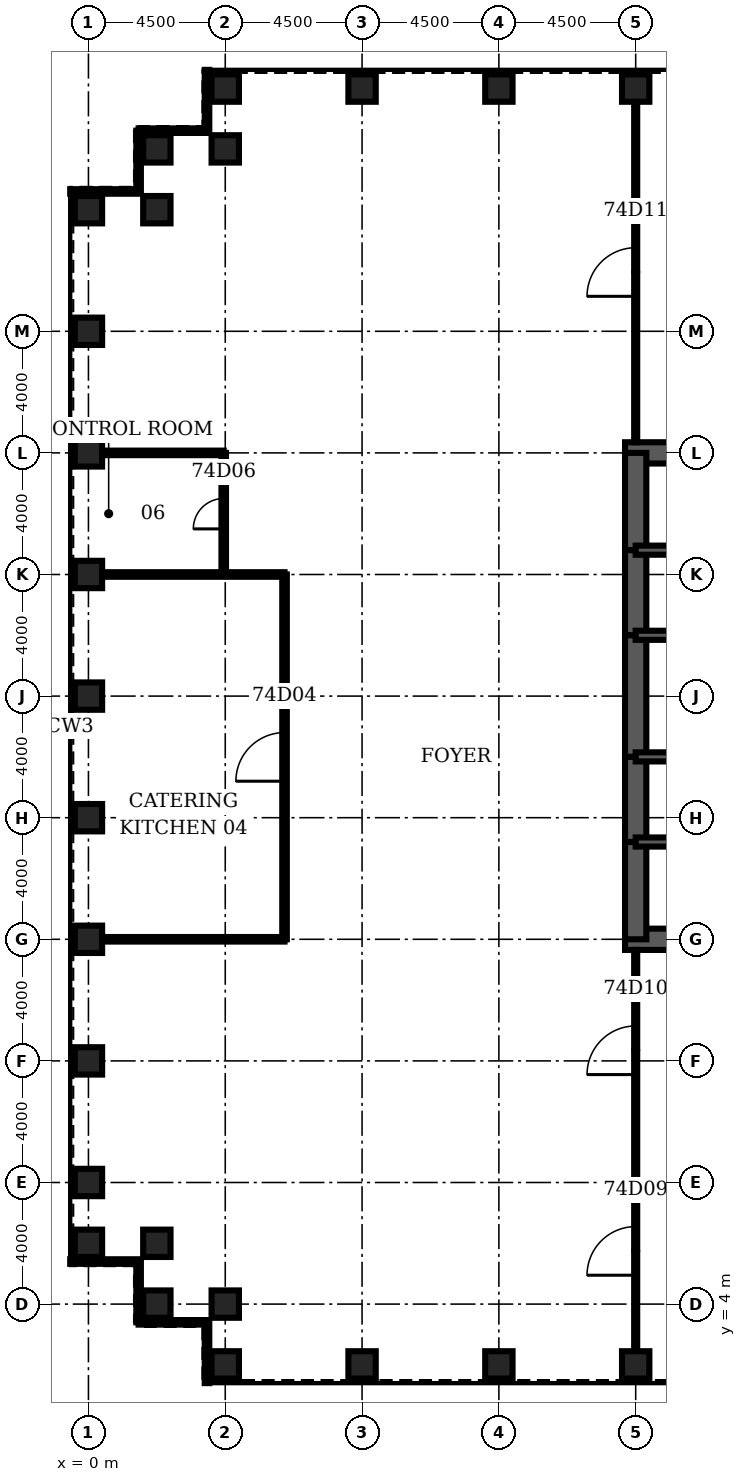
"""IFC4 building model, lengths in metres.
Left out: names, types, materials, properties, quantities, classifications, styles, units other than length and angle.
Written with IfcOpenShell. Run it as: python <this file> out.ifc"""

import sys

from ifc_helpers import new_model, si_unit, direction, frame, frame_2d, origin, origin_2d, place, context, subcontext, project, spatial, rectangle, hollow_rectangle, extrude, element, fill, save


model = new_model("IFC4")
c1 = context("Model", 3, precision=1e-05, world=origin(), true_north=direction((0.0, 1.0)))
c2 = subcontext(c1, "Body", "Model", "MODEL_VIEW")
j1 = project(units=[si_unit("LENGTHUNIT", "METRE"), si_unit("PLANEANGLEUNIT", "RADIAN")], contexts=[c1])
p1 = place(None, origin())
s1 = spatial("IfcSite", under=j1, at=p1, CompositionType="ELEMENT")
p2 = place(p1, origin())
s2 = spatial("IfcBuilding", under=s1, at=p2, CompositionType="ELEMENT")
p3 = place(p2, frame((0.0, 0.0, 325.7)))
s3 = spatial("IfcBuildingStorey", under=s2, at=p3, CompositionType="ELEMENT", Elevation=325.7)
for number, where, z_axis, x_axis in (
    (1, (4.5, 2.0, 0.0), (0.0, 0.0, 1.0), (0.0, 1.0, 0.0)),
    (2, (9.0, 2.0, 0.0), (0.0, 0.0, 1.0), (0.0, 1.0, 0.0)),
    (3, (13.5, 2.0, 0.0), (0.0, 0.0, 1.0), (0.0, 1.0, 0.0)),
    (4, (18.0, 2.0, 0.0), (0.0, 0.0, 1.0), (0.0, 1.0, 0.0)),
    (5, (18.0, 44.0, 0.0), (0.0, 0.0, 1.0), (0.0, 1.0, 0.0)),
    (6, (13.5, 44.0, 0.0), (0.0, 0.0, 1.0), (0.0, 1.0, 0.0)),
    (7, (9.0, 44.0, 0.0), (0.0, 0.0, 1.0), (0.0, 1.0, 0.0)),
    (8, (4.5, 44.0, 0.0), (0.0, 0.0, 1.0), (0.0, 1.0, 0.0)),
    (9, (4.5, 42.0, 0.0), (0.0, 0.0, 1.0), (0.0, 1.0, 0.0)),
    (10, (2.25, 42.0, 0.0), (0.0, 0.0, 1.0), (1.0, 0.0, 0.0)),
    (11, (2.25, 40.0, 0.0), (0.0, 0.0, 1.0), (1.0, 0.0, 0.0)),
    (12, (0.0, 40.0, 0.0), (0.0, 0.0, 1.0), (1.0, 0.0, 0.0)),
    (13, (0.0, 36.0, 0.0), (0.0, 0.0, 1.0), (1.0, 0.0, 0.0)),
    (14, (0.0, 32.0, 0.0), (0.0, 0.0, 1.0), (1.0, 0.0, 0.0)),
    (15, (0.0, 28.0, 0.0), (0.0, 0.0, 1.0), (1.0, 0.0, 0.0)),
    (16, (0.0, 24.0, 0.0), (0.0, 0.0, 1.0), (1.0, 0.0, 0.0)),
    (17, (0.0, 20.0, 0.0), (0.0, 0.0, 1.0), (1.0, 0.0, 0.0)),
    (18, (0.0, 16.0, 0.0), (0.0, 0.0, 1.0), (1.0, 0.0, 0.0)),
    (19, (0.0, 12.0, 0.0), (0.0, 0.0, 1.0), (1.0, 0.0, 0.0)),
    (20, (0.0, 8.0, 0.0), (0.0, 0.0, 1.0), (1.0, 0.0, 0.0)),
    (21, (0.0, 6.0, 0.0), (0.0, 0.0, 1.0), (1.0, 0.0, 0.0)),
    (22, (2.25, 6.0, 0.0), (0.0, 0.0, 1.0), (1.0, 0.0, 0.0)),
    (23, (2.25, 4.0, 0.0), (0.0, 0.0, 1.0), (1.0, 0.0, 0.0)),
    (24, (4.5, 4.0, 0.0), (0.0, 0.0, 1.0), (0.0, 1.0, 0.0)),
):
    element("IfcColumn", number, at=place(p3, frame(where, z_axis=z_axis, x_axis=x_axis)), inside=s3, PredefinedType="COLUMN", context=c2, shape_type="SweptSolid", body=[
        extrude(hollow_rectangle(XDim=0.9, YDim=0.9, WallThickness=0.05, at=origin_2d()), origin(), (0.0, 0.0, 1.0), 4.2),
    ])
for number, where, z_axis, x_axis in (
    (25, (17.65, 16.0, 0.0), (0.0, 0.0, 1.0), (1.0, 0.0, 0.0)),
    (26, (27.0, 32.0, 0.0), (0.0, 0.0, 1.0), (-1.0, 0.0, 0.0)),
):
    element("IfcWall", number, at=place(p3, frame(where, z_axis=z_axis, x_axis=x_axis)), inside=s3, PredefinedType="SHEAR", context=c2, shape_type="SweptSolid", body=[
        extrude(rectangle(XDim=9.35, YDim=0.7, at=frame_2d((4.675, 0.0))), origin(), (0.0, 0.0, 1.0), 4.2),
    ])
p4 = place(p3, frame((18.0, 32.0, 0.0), z_axis=(0.0, 0.0, 1.0), x_axis=(0.0, -1.0, 0.0)))
e27 = element("IfcWall", 27, at=p4, inside=s3, PredefinedType="SHEAR", context=c2, shape_type="SweptSolid", body=[
    extrude(rectangle(XDim=3.2, YDim=0.7, at=frame_2d((1.6, 0.0))), origin(), (0.0, 0.0, 1.0), 4.2),
])
p5 = place(p3, frame((18.0, 28.8, 0.0), z_axis=(0.0, 0.0, 1.0), x_axis=(0.0, -1.0, 0.0)))
e28 = element("IfcWall", 28, at=p5, inside=s3, PredefinedType="SHEAR", context=c2, shape_type="SweptSolid", body=[
    extrude(rectangle(XDim=2.8, YDim=0.7, at=frame_2d((1.4, 0.0))), origin(), (0.0, 0.0, 1.0), 4.2),
])
p6 = place(p5, frame((0.4, 0.0, 0.0)))
e29 = element("IfcOpeningElement", 29, at=p6, cuts=e28, PredefinedType="OPENING", context=c2, shape_type="SweptSolid", body=[
    extrude(rectangle(XDim=1.8, YDim=2.1, at=frame_2d((0.9, 1.05))), frame((0.0, 0.36, 0.0), z_axis=(0.0, -1.0, 0.0), x_axis=(1.0, 0.0, 0.0)), (0.0, 0.0, 1.0), 0.72),
])
p7 = place(p3, frame((18.0, 26.0, 0.0), z_axis=(0.0, 0.0, 1.0), x_axis=(0.0, -1.0, 0.0)))
e30 = element("IfcWall", 30, at=p7, inside=s3, PredefinedType="SHEAR", context=c2, shape_type="SweptSolid", body=[
    extrude(rectangle(XDim=4.0, YDim=0.7, at=frame_2d((2.0, 0.0))), origin(), (0.0, 0.0, 1.0), 4.2),
])
p8 = place(p3, frame((18.0, 22.0, 0.0), z_axis=(0.0, 0.0, 1.0), x_axis=(0.0, -1.0, 0.0)))
e31 = element("IfcWall", 31, at=p8, inside=s3, PredefinedType="SHEAR", context=c2, shape_type="SweptSolid", body=[
    extrude(rectangle(XDim=2.8, YDim=0.7, at=frame_2d((1.4, 0.0))), origin(), (0.0, 0.0, 1.0), 4.2),
])
p9 = place(p8, frame((0.6, 0.0, 0.0)))
e32 = element("IfcOpeningElement", 32, at=p9, cuts=e31, PredefinedType="OPENING", context=c2, shape_type="SweptSolid", body=[
    extrude(rectangle(XDim=1.8, YDim=2.1, at=frame_2d((0.9, 1.05))), frame((0.0, 0.36, 0.0), z_axis=(0.0, -1.0, 0.0), x_axis=(1.0, 0.0, 0.0)), (0.0, 0.0, 1.0), 0.72),
])
p10 = place(p3, frame((18.0, 19.2, 0.0), z_axis=(0.0, 0.0, 1.0), x_axis=(0.0, -1.0, 0.0)))
e33 = element("IfcWall", 33, at=p10, inside=s3, PredefinedType="SHEAR", context=c2, shape_type="SweptSolid", body=[
    extrude(rectangle(XDim=3.2, YDim=0.7, at=frame_2d((1.6, 0.0))), origin(), (0.0, 0.0, 1.0), 4.2),
])
p11 = place(p3, frame((18.0, 19.2, 0.0), z_axis=(0.0, 0.0, 1.0), x_axis=(1.0, 0.0, 0.0)))
e34 = element("IfcWall", 34, at=p11, inside=s3, PredefinedType="SOLIDWALL", context=c2, shape_type="SweptSolid", body=[
    extrude(rectangle(XDim=9.0, YDim=0.3, at=frame_2d((4.5, 0.0))), origin(), (0.0, 0.0, 1.0), 4.2),
])
p12 = place(p11, frame((0.65, 0.0, 0.0)))
e35 = element("IfcOpeningElement", 35, at=p12, cuts=e34, PredefinedType="OPENING", context=c2, shape_type="SweptSolid", body=[
    extrude(rectangle(XDim=1.0, YDim=2.1, at=frame_2d((0.5, 1.05))), frame((0.0, 0.16, 0.0), z_axis=(0.0, -1.0, 0.0), x_axis=(1.0, 0.0, 0.0)), (0.0, 0.0, 1.0), 0.32),
])
p13 = place(p3, frame((18.0, 28.8, 0.0), z_axis=(0.0, 0.0, 1.0), x_axis=(1.0, 0.0, 0.0)))
e36 = element("IfcWall", 36, at=p13, inside=s3, PredefinedType="SOLIDWALL", context=c2, shape_type="SweptSolid", body=[
    extrude(rectangle(XDim=9.0, YDim=0.3, at=frame_2d((4.5, 0.0))), origin(), (0.0, 0.0, 1.0), 4.2),
])
p14 = place(p13, frame((0.65, 0.0, 0.0)))
e37 = element("IfcOpeningElement", 37, at=p14, cuts=e36, PredefinedType="OPENING", context=c2, shape_type="SweptSolid", body=[
    extrude(rectangle(XDim=1.0, YDim=2.1, at=frame_2d((0.5, 1.05))), frame((0.0, 0.16, 0.0), z_axis=(0.0, -1.0, 0.0), x_axis=(1.0, 0.0, 0.0)), (0.0, 0.0, 1.0), 0.32),
])
p15 = place(p3, frame((18.0, 22.0, 0.0), z_axis=(0.0, 0.0, 1.0), x_axis=(1.0, 0.0, 0.0)))
e38 = element("IfcWall", 38, at=p15, inside=s3, PredefinedType="SOLIDWALL", context=c2, shape_type="SweptSolid", body=[
    extrude(rectangle(XDim=6.0, YDim=0.3, at=frame_2d((3.0, 0.0))), origin(), (0.0, 0.0, 1.0), 4.2),
])
p16 = place(p15, frame((4.4, 0.0, 0.0)))
e39 = element("IfcOpeningElement", 39, at=p16, cuts=e38, PredefinedType="OPENING", context=c2, shape_type="SweptSolid", body=[
    extrude(rectangle(XDim=1.0, YDim=2.1, at=frame_2d((0.5, 1.05))), frame((0.0, 0.16, 0.0), z_axis=(0.0, -1.0, 0.0), x_axis=(1.0, 0.0, 0.0)), (0.0, 0.0, 1.0), 0.32),
])
p17 = place(p15, frame((0.75, 0.0, 0.0)))
e40 = element("IfcOpeningElement", 40, at=p17, cuts=e38, PredefinedType="OPENING", context=c2, shape_type="SweptSolid", body=[
    extrude(rectangle(XDim=1.0, YDim=2.1, at=frame_2d((0.5, 1.05))), frame((0.0, 0.16, 0.0), z_axis=(0.0, -1.0, 0.0), x_axis=(1.0, 0.0, 0.0)), (0.0, 0.0, 1.0), 0.32),
])
p18 = place(p3, frame((18.0, 26.0, 0.0), z_axis=(0.0, 0.0, 1.0), x_axis=(1.0, 0.0, 0.0)))
e41 = element("IfcWall", 41, at=p18, inside=s3, PredefinedType="SOLIDWALL", context=c2, shape_type="SweptSolid", body=[
    extrude(rectangle(XDim=6.0, YDim=0.3, at=frame_2d((3.0, 0.0))), origin(), (0.0, 0.0, 1.0), 4.2),
])
for number, where, z_axis, x_axis in (
    (42, (0.45, 16.0, 0.0), (0.0, 0.0, 1.0), (1.0, 0.0, 0.0)),
    (43, (0.45, 28.0, 0.0), (0.0, 0.0, 1.0), (1.0, 0.0, 0.0)),
):
    element("IfcWall", number, at=place(p3, frame(where, z_axis=z_axis, x_axis=x_axis)), inside=s3, PredefinedType="PARTITIONING", context=c2, shape_type="SweptSolid", body=[
        extrude(rectangle(XDim=6.0, YDim=0.15, at=frame_2d((3.0, 0.0))), origin(), (0.0, 0.0, 1.0), 3.0),
    ])
p19 = place(p3, frame((0.45, 32.0, 0.0), z_axis=(0.0, 0.0, 1.0), x_axis=(1.0, 0.0, 0.0)))
e44 = element("IfcWall", 44, at=p19, inside=s3, PredefinedType="PARTITIONING", context=c2, shape_type="SweptSolid", body=[
    extrude(rectangle(XDim=4.0, YDim=0.15, at=frame_2d((2.0, 0.0))), origin(), (0.0, 0.0, 1.0), 3.0),
])
p20 = place(p3, frame((4.45, 28.0, 0.0), z_axis=(0.0, 0.0, 1.0), x_axis=(0.0, 1.0, 0.0)))
e45 = element("IfcWall", 45, at=p20, inside=s3, PredefinedType="PARTITIONING", context=c2, shape_type="SweptSolid", body=[
    extrude(rectangle(XDim=4.0, YDim=0.15, at=frame_2d((2.0, 0.0))), origin(), (0.0, 0.0, 1.0), 3.0),
])
p21 = place(p20, frame((1.5, 0.0, 0.0)))
e46 = element("IfcOpeningElement", 46, at=p21, cuts=e45, PredefinedType="OPENING", context=c2, shape_type="SweptSolid", body=[
    extrude(rectangle(XDim=1.0, YDim=2.1, at=frame_2d((0.5, 1.05))), frame((0.0, 0.085, 0.0), z_axis=(0.0, -1.0, 0.0), x_axis=(1.0, 0.0, 0.0)), (0.0, 0.0, 1.0), 0.17),
])
p22 = place(p3, frame((6.45, 16.0, 0.0), z_axis=(0.0, 0.0, 1.0), x_axis=(0.0, 1.0, 0.0)))
e47 = element("IfcWall", 47, at=p22, inside=s3, PredefinedType="PARTITIONING", context=c2, shape_type="SweptSolid", body=[
    extrude(rectangle(XDim=12.0, YDim=0.15, at=frame_2d((6.0, 0.0))), origin(), (0.0, 0.0, 1.0), 3.0),
])
p23 = place(p22, frame((5.2, 0.0, 0.0)))
e48 = element("IfcOpeningElement", 48, at=p23, cuts=e47, PredefinedType="OPENING", context=c2, shape_type="SweptSolid", body=[
    extrude(rectangle(XDim=1.6, YDim=2.1, at=frame_2d((0.8, 1.05))), frame((0.0, 0.085, 0.0), z_axis=(0.0, -1.0, 0.0), x_axis=(1.0, 0.0, 0.0)), (0.0, 0.0, 1.0), 0.17),
])
p24 = place(p3, frame((18.0, 2.45, 0.0), z_axis=(0.0, 0.0, 1.0), x_axis=(0.0, 1.0, 0.0)))
e49 = element("IfcWall", 49, at=p24, inside=s3, PredefinedType="PARTITIONING", context=c2, shape_type="SweptSolid", body=[
    extrude(rectangle(XDim=13.2, YDim=0.1, at=frame_2d((6.6, 0.0))), origin(), (0.0, 0.0, 1.0), 3.0),
])
p25 = place(p24, frame((2.5, 0.0, 0.0)))
e50 = element("IfcOpeningElement", 50, at=p25, cuts=e49, PredefinedType="OPENING", context=c2, shape_type="SweptSolid", body=[
    extrude(rectangle(XDim=1.6, YDim=2.1, at=frame_2d((0.8, 1.05))), frame((0.0, 0.06, 0.0), z_axis=(0.0, -1.0, 0.0), x_axis=(1.0, 0.0, 0.0)), (0.0, 0.0, 1.0), 0.12),
])
p26 = place(p24, frame((9.1, 0.0, 0.0)))
e51 = element("IfcOpeningElement", 51, at=p26, cuts=e49, PredefinedType="OPENING", context=c2, shape_type="SweptSolid", body=[
    extrude(rectangle(XDim=1.6, YDim=2.1, at=frame_2d((0.8, 1.05))), frame((0.0, 0.06, 0.0), z_axis=(0.0, -1.0, 0.0), x_axis=(1.0, 0.0, 0.0)), (0.0, 0.0, 1.0), 0.12),
])
p27 = place(p3, frame((18.0, 32.35, 0.0), z_axis=(0.0, 0.0, 1.0), x_axis=(0.0, 1.0, 0.0)))
e52 = element("IfcWall", 52, at=p27, inside=s3, PredefinedType="PARTITIONING", context=c2, shape_type="SweptSolid", body=[
    extrude(rectangle(XDim=11.2, YDim=0.1, at=frame_2d((5.6, 0.0))), origin(), (0.0, 0.0, 1.0), 3.0),
])
p28 = place(p27, frame((4.8, 0.0, 0.0)))
e53 = element("IfcOpeningElement", 53, at=p28, cuts=e52, PredefinedType="OPENING", context=c2, shape_type="SweptSolid", body=[
    extrude(rectangle(XDim=1.6, YDim=2.1, at=frame_2d((0.8, 1.05))), frame((0.0, 0.06, 0.0), z_axis=(0.0, -1.0, 0.0), x_axis=(1.0, 0.0, 0.0)), (0.0, 0.0, 1.0), 0.12),
])
p29 = place(p3, frame((3.9, 44.6, 0.0), z_axis=(0.0, 0.0, 1.0), x_axis=(0.0, -1.0, 0.0)))
e54 = element("IfcWall", 54, at=p29, inside=s3, PredefinedType="ELEMENTEDWALL", context=c2, shape_type="SweptSolid", body=[
    extrude(rectangle(XDim=2.0, YDim=0.15, at=frame_2d((1.0, 0.0))), origin(), (0.0, 0.0, 1.0), 4.04),
])
p30 = place(p3, frame((3.9, 42.6, 0.0), z_axis=(0.0, 0.0, 1.0), x_axis=(-1.0, 0.0, 0.0)))
e55 = element("IfcWall", 55, at=p30, inside=s3, PredefinedType="ELEMENTEDWALL", context=c2, shape_type="SweptSolid", body=[
    extrude(rectangle(XDim=2.25, YDim=0.15, at=frame_2d((1.125, 0.0))), origin(), (0.0, 0.0, 1.0), 4.04),
])
p31 = place(p3, frame((1.65, 42.6, 0.0), z_axis=(0.0, 0.0, 1.0), x_axis=(0.0, -1.0, 0.0)))
e56 = element("IfcWall", 56, at=p31, inside=s3, PredefinedType="ELEMENTEDWALL", context=c2, shape_type="SweptSolid", body=[
    extrude(rectangle(XDim=2.0, YDim=0.15, at=frame_2d((1.0, 0.0))), origin(), (0.0, 0.0, 1.0), 4.04),
])
for number, where, z_axis, x_axis in (
    (57, (1.65, 40.6, 0.0), (0.0, 0.0, 1.0), (-1.0, 0.0, 0.0)),
    (58, (-0.6, 5.4, 0.0), (0.0, 0.0, 1.0), (1.0, 0.0, 0.0)),
):
    element("IfcWall", number, at=place(p3, frame(where, z_axis=z_axis, x_axis=x_axis)), inside=s3, PredefinedType="ELEMENTEDWALL", context=c2, shape_type="SweptSolid", body=[
        extrude(rectangle(XDim=2.25, YDim=0.15, at=frame_2d((1.125, 0.0))), origin(), (0.0, 0.0, 1.0), 4.04),
    ])
p32 = place(p3, frame((1.65, 5.4, 0.0), z_axis=(0.0, 0.0, 1.0), x_axis=(0.0, -1.0, 0.0)))
e59 = element("IfcWall", 59, at=p32, inside=s3, PredefinedType="ELEMENTEDWALL", context=c2, shape_type="SweptSolid", body=[
    extrude(rectangle(XDim=2.0, YDim=0.15, at=frame_2d((1.0, 0.0))), origin(), (0.0, 0.0, 1.0), 4.04),
])
p33 = place(p3, frame((1.65, 3.4, 0.0), z_axis=(0.0, 0.0, 1.0), x_axis=(1.0, 0.0, 0.0)))
e60 = element("IfcWall", 60, at=p33, inside=s3, PredefinedType="ELEMENTEDWALL", context=c2, shape_type="SweptSolid", body=[
    extrude(rectangle(XDim=2.25, YDim=0.15, at=frame_2d((1.125, 0.0))), origin(), (0.0, 0.0, 1.0), 4.04),
])
p34 = place(p3, frame((3.9, 3.4, 0.0), z_axis=(0.0, 0.0, 1.0), x_axis=(0.0, -1.0, 0.0)))
e61 = element("IfcWall", 61, at=p34, inside=s3, PredefinedType="ELEMENTEDWALL", context=c2, shape_type="SweptSolid", body=[
    extrude(rectangle(XDim=2.0, YDim=0.15, at=frame_2d((1.0, 0.0))), origin(), (0.0, 0.0, 1.0), 4.04),
])
p35 = place(p23, origin())
e62 = element("IfcDoor", 62, at=p35, inside=s3, OperationType="SINGLE_SWING_LEFT", PredefinedType="DOOR", context=c2, shape_type="SweptSolid", body=[
    extrude(rectangle(XDim=1.6, YDim=2.1, at=frame_2d((0.8, 1.05))), frame((0.0, 0.025, 0.0), z_axis=(0.0, -1.0, 0.0), x_axis=(1.0, 0.0, 0.0)), (0.0, 0.0, 1.0), 0.05),
])
fill(e48, e62)
p36 = place(p21, origin())
e63 = element("IfcDoor", 63, at=p36, inside=s3, OperationType="SINGLE_SWING_LEFT", PredefinedType="DOOR", context=c2, shape_type="SweptSolid", body=[
    extrude(rectangle(XDim=1.0, YDim=2.1, at=frame_2d((0.5, 1.05))), frame((0.0, 0.025, 0.0), z_axis=(0.0, -1.0, 0.0), x_axis=(1.0, 0.0, 0.0)), (0.0, 0.0, 1.0), 0.05),
])
fill(e46, e63)
p37 = place(p25, origin())
e64 = element("IfcDoor", 64, at=p37, inside=s3, OperationType="SINGLE_SWING_LEFT", PredefinedType="DOOR", context=c2, shape_type="SweptSolid", body=[
    extrude(rectangle(XDim=1.6, YDim=2.1, at=frame_2d((0.8, 1.05))), frame((0.0, 0.025, 0.0), z_axis=(0.0, -1.0, 0.0), x_axis=(1.0, 0.0, 0.0)), (0.0, 0.0, 1.0), 0.05),
])
fill(e50, e64)
p38 = place(p26, origin())
e65 = element("IfcDoor", 65, at=p38, inside=s3, OperationType="SINGLE_SWING_LEFT", PredefinedType="DOOR", context=c2, shape_type="SweptSolid", body=[
    extrude(rectangle(XDim=1.6, YDim=2.1, at=frame_2d((0.8, 1.05))), frame((0.0, 0.025, 0.0), z_axis=(0.0, -1.0, 0.0), x_axis=(1.0, 0.0, 0.0)), (0.0, 0.0, 1.0), 0.05),
])
fill(e51, e65)
p39 = place(p28, origin())
e66 = element("IfcDoor", 66, at=p39, inside=s3, OperationType="SINGLE_SWING_LEFT", PredefinedType="DOOR", context=c2, shape_type="SweptSolid", body=[
    extrude(rectangle(XDim=1.6, YDim=2.1, at=frame_2d((0.8, 1.05))), frame((0.0, 0.025, 0.0), z_axis=(0.0, -1.0, 0.0), x_axis=(1.0, 0.0, 0.0)), (0.0, 0.0, 1.0), 0.05),
])
fill(e53, e66)
p40 = place(p12, origin())
e67 = element("IfcDoor", 67, at=p40, inside=s3, OperationType="SINGLE_SWING_LEFT", PredefinedType="DOOR", context=c2, shape_type="SweptSolid", body=[
    extrude(rectangle(XDim=1.0, YDim=2.1, at=frame_2d((0.5, 1.05))), frame((0.0, 0.025, 0.0), z_axis=(0.0, -1.0, 0.0), x_axis=(1.0, 0.0, 0.0)), (0.0, 0.0, 1.0), 0.05),
])
fill(e35, e67)
p41 = place(p14, origin())
e68 = element("IfcDoor", 68, at=p41, inside=s3, OperationType="SINGLE_SWING_LEFT", PredefinedType="DOOR", context=c2, shape_type="SweptSolid", body=[
    extrude(rectangle(XDim=1.0, YDim=2.1, at=frame_2d((0.5, 1.05))), frame((0.0, 0.025, 0.0), z_axis=(0.0, -1.0, 0.0), x_axis=(1.0, 0.0, 0.0)), (0.0, 0.0, 1.0), 0.05),
])
fill(e37, e68)
p42 = place(p9, origin())
e69 = element("IfcDoor", 69, at=p42, inside=s3, OperationType="SINGLE_SWING_LEFT", PredefinedType="DOOR", context=c2, shape_type="SweptSolid", body=[
    extrude(rectangle(XDim=1.8, YDim=2.1, at=frame_2d((0.9, 1.05))), frame((0.0, 0.35, 0.0), z_axis=(0.0, -1.0, 0.0), x_axis=(1.0, 0.0, 0.0)), (0.0, 0.0, 1.0), 0.699),
])
fill(e32, e69)
p43 = place(p6, origin())
e70 = element("IfcDoor", 70, at=p43, inside=s3, OperationType="SINGLE_SWING_LEFT", PredefinedType="DOOR", context=c2, shape_type="SweptSolid", body=[
    extrude(rectangle(XDim=1.8, YDim=2.1, at=frame_2d((0.9, 1.05))), frame((0.0, 0.35, 0.0), z_axis=(0.0, -1.0, 0.0), x_axis=(1.0, 0.0, 0.0)), (0.0, 0.0, 1.0), 0.699),
])
fill(e29, e70)
p44 = place(p17, origin())
e71 = element("IfcDoor", 71, at=p44, inside=s3, OperationType="SINGLE_SWING_LEFT", PredefinedType="DOOR", context=c2, shape_type="SweptSolid", body=[
    extrude(rectangle(XDim=1.0, YDim=2.1, at=frame_2d((0.5, 1.05))), frame((0.0, 0.025, 0.0), z_axis=(0.0, -1.0, 0.0), x_axis=(1.0, 0.0, 0.0)), (0.0, 0.0, 1.0), 0.05),
])
fill(e40, e71)
save(model, sys.argv[1])
